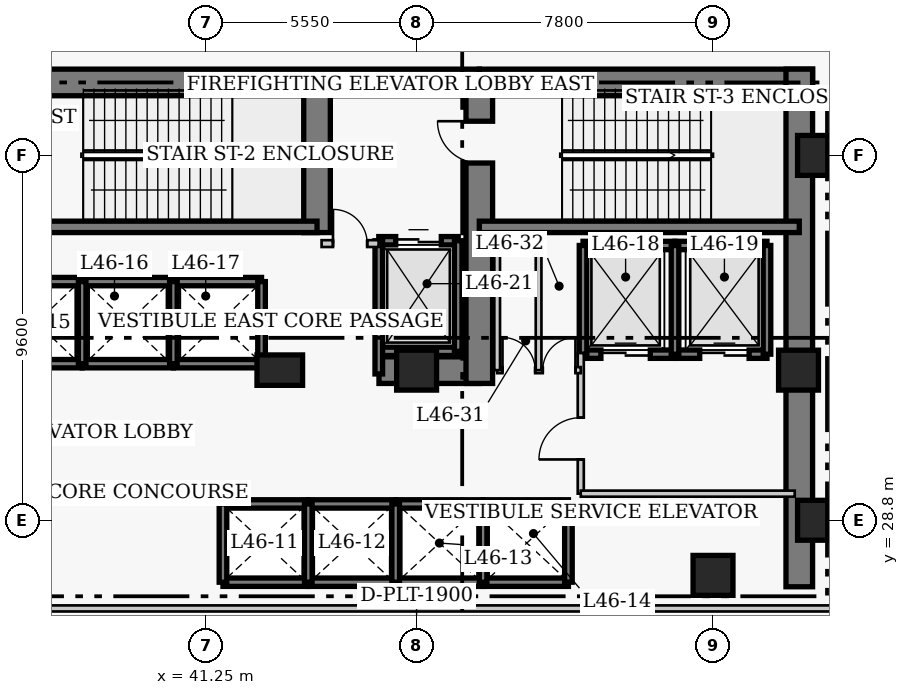
"""IFC4 building model, lengths in metres.
Left out: names, types, materials, properties, quantities, classifications, styles, units other than length and angle.
Written with IfcOpenShell. Run it as: python <this file> out.ifc"""

import sys

from ifc_helpers import new_model, si_unit, direction, frame, frame_2d, origin, origin_2d, place, context, subcontext, project, spatial, rectangle, extrude, element, fill, save


model = new_model("IFC4")
c1 = context("Model", 3, precision=1e-05, world=origin(), true_north=direction((0.0, 1.0)))
c2 = subcontext(c1, "Body", "Model", "MODEL_VIEW")
j1 = project(units=[si_unit("LENGTHUNIT", "METRE"), si_unit("PLANEANGLEUNIT", "RADIAN")], contexts=[c1])
p1 = place(None, origin())
s1 = spatial("IfcSite", under=j1, at=p1, CompositionType="ELEMENT")
p2 = place(p1, origin())
s2 = spatial("IfcBuilding", under=s1, at=p2, CompositionType="ELEMENT")
p3 = place(p2, frame((0.0, 0.0, 184.0)))
s3 = spatial("IfcBuildingStorey", under=s2, at=p3, CompositionType="ELEMENT", Elevation=184.0)
p4 = place(p3, frame((35.85, 40.32, 0.0), z_axis=(0.0, 0.0, 1.0), x_axis=(1.0, 0.0, 0.0)))
e1 = element("IfcWall", 1, at=p4, inside=s3, PredefinedType="SHEAR", context=c2, shape_type="SweptSolid", body=[
    extrude(rectangle(XDim=12.6, YDim=0.7, at=frame_2d((6.3, 0.0))), origin(), (0.0, 0.0, 1.0), 5.0),
])
p5 = place(p3, frame((48.45, 40.32, 0.0), z_axis=(0.0, 0.0, 1.0), x_axis=(1.0, 0.0, 0.0)))
e2 = element("IfcWall", 2, at=p5, inside=s3, PredefinedType="SHEAR", context=c2, shape_type="SweptSolid", body=[
    extrude(rectangle(XDim=8.77, YDim=0.7, at=frame_2d((4.385, 0.0))), origin(), (0.0, 0.0, 1.0), 5.0),
])
p6 = place(p3, frame((56.87, 27.05, 0.0), z_axis=(0.0, 0.0, 1.0), x_axis=(0.0, 1.0, 0.0)))
e3 = element("IfcWall", 3, at=p6, inside=s3, PredefinedType="SHEAR", context=c2, shape_type="SweptSolid", body=[
    extrude(rectangle(XDim=13.62, YDim=0.7, at=frame_2d((6.81, 0.0))), origin(), (0.0, 0.0, 1.0), 5.0),
])
p7 = place(p3, frame((45.81, 32.75, 0.0), z_axis=(0.0, 0.0, 1.0), x_axis=(1.0, 0.0, 0.0)))
e4 = element("IfcWall", 4, at=p7, inside=s3, PredefinedType="SHEAR", context=c2, shape_type="SweptSolid", body=[
    extrude(rectangle(XDim=2.64, YDim=0.7, at=frame_2d((1.32, 0.0))), origin(), (0.0, 0.0, 1.0), 5.0),
])
p8 = place(p3, frame((44.18, 36.37, 0.0), z_axis=(0.0, 0.0, 1.0), x_axis=(0.0, 1.0, 0.0)))
e5 = element("IfcWall", 5, at=p8, inside=s3, PredefinedType="SHEAR", context=c2, shape_type="SweptSolid", body=[
    extrude(rectangle(XDim=3.95, YDim=0.7, at=frame_2d((1.975, 0.0))), origin(), (0.0, 0.0, 1.0), 5.0),
])
p9 = place(p3, frame((48.45, 32.4, 0.0), z_axis=(0.0, 0.0, 1.0), x_axis=(0.0, 1.0, 0.0)))
e6 = element("IfcWall", 6, at=p9, inside=s3, PredefinedType="SHEAR", context=c2, shape_type="SweptSolid", body=[
    extrude(rectangle(XDim=7.92, YDim=0.7, at=frame_2d((3.96, 0.0))), origin(), (0.0, 0.0, 1.0), 5.0),
])
p10 = place(p9, frame((5.8, 0.0, 0.0)))
e7 = element("IfcOpeningElement", 7, at=p10, cuts=e6, PredefinedType="OPENING", context=c2, shape_type="SweptSolid", body=[
    extrude(rectangle(XDim=1.1, YDim=2.15, at=frame_2d((0.55, 1.075))), frame((0.0, 0.36, 0.0), z_axis=(0.0, -1.0, 0.0), x_axis=(1.0, 0.0, 0.0)), (0.0, 0.0, 1.0), 0.72),
])
p11 = place(p3, frame((35.85, 36.52, 0.0), z_axis=(0.0, 0.0, 1.0), x_axis=(1.0, 0.0, 0.0)))
e8 = element("IfcWall", 8, at=p11, inside=s3, PredefinedType="SHEAR", context=c2, shape_type="SweptSolid", body=[
    extrude(rectangle(XDim=8.33, YDim=0.3, at=frame_2d((4.165, 0.0))), origin(), (0.0, 0.0, 1.0), 5.0),
])
p12 = place(p3, frame((48.45, 36.52, 0.0), z_axis=(0.0, 0.0, 1.0), x_axis=(1.0, 0.0, 0.0)))
e9 = element("IfcWall", 9, at=p12, inside=s3, PredefinedType="SHEAR", context=c2, shape_type="SweptSolid", body=[
    extrude(rectangle(XDim=8.42, YDim=0.3, at=frame_2d((4.21, 0.0))), origin(), (0.0, 0.0, 1.0), 5.0),
])
for number, where, z_axis, x_axis in (
    (10, (57.35, 28.8, 0.0), (0.0, 0.0, 1.0), (1.0, 0.0, 0.0)),
    (11, (57.35, 38.4, 0.0), (0.0, 0.0, 1.0), (1.0, 0.0, 0.0)),
):
    element("IfcColumn", number, at=place(p3, frame(where, z_axis=z_axis, x_axis=x_axis)), inside=s3, PredefinedType="COLUMN", context=c2, shape_type="SweptSolid", body=[
        extrude(rectangle(XDim=1.05, YDim=1.05, at=origin_2d()), origin(), (0.0, 0.0, 1.0), 5.0),
    ])
p13 = place(p3, frame((43.2, 32.75, 0.0), z_axis=(0.0, 0.0, 1.0), x_axis=(1.0, 0.0, 0.0)))
e12 = element("IfcColumn", 12, at=p13, inside=s3, PredefinedType="COLUMN", context=c2, shape_type="SweptSolid", body=[
    extrude(rectangle(XDim=1.2, YDim=0.8, at=origin_2d()), origin(), (0.0, 0.0, 1.0), 5.0),
])
for number, where, z_axis, x_axis in (
    (13, (46.8, 32.75, 0.0), (0.0, 0.0, 1.0), (1.0, 0.0, 0.0)),
    (14, (54.6, 27.35, 0.0), (0.0, 0.0, 1.0), (1.0, 0.0, 0.0)),
    (15, (56.85, 32.75, 0.0), (0.0, 0.0, 1.0), (1.0, 0.0, 0.0)),
):
    element("IfcColumn", number, at=place(p3, frame(where, z_axis=z_axis, x_axis=x_axis)), inside=s3, PredefinedType="COLUMN", context=c2, shape_type="SweptSolid", body=[
        extrude(rectangle(XDim=1.05, YDim=1.05, at=origin_2d()), origin(), (0.0, 0.0, 1.0), 5.0),
    ])
for number, where, z_axis, x_axis in (
    (16, (41.705, 29.23, 0.0), (0.0, 0.0, 1.0), (1.0, 0.0, 0.0)),
    (17, (41.705, 27.17, 0.0), (0.0, 0.0, 1.0), (1.0, 0.0, 0.0)),
):
    element("IfcWall", number, at=place(p3, frame(where, z_axis=z_axis, x_axis=x_axis)), inside=s3, PredefinedType="SHEAR", context=c2, shape_type="SweptSolid", body=[
        extrude(rectangle(XDim=2.245, YDim=0.22, at=frame_2d((1.123, 0.0))), origin(), (0.0, 0.0, 1.0), 5.0),
    ])
p14 = place(p3, frame((41.705, 27.17, 0.0), z_axis=(0.0, 0.0, 1.0), x_axis=(0.0, 1.0, 0.0)))
e18 = element("IfcWall", 18, at=p14, inside=s3, PredefinedType="SHEAR", context=c2, shape_type="SweptSolid", body=[
    extrude(rectangle(XDim=2.06, YDim=0.2, at=frame_2d((1.03, 0.0))), origin(), (0.0, 0.0, 1.0), 5.0),
])
for number, where, z_axis, x_axis in (
    (19, (43.95, 29.23, 0.0), (0.0, 0.0, 1.0), (1.0, 0.0, 0.0)),
    (20, (43.95, 27.17, 0.0), (0.0, 0.0, 1.0), (1.0, 0.0, 0.0)),
):
    element("IfcWall", number, at=place(p3, frame(where, z_axis=z_axis, x_axis=x_axis)), inside=s3, PredefinedType="SHEAR", context=c2, shape_type="SweptSolid", body=[
        extrude(rectangle(XDim=2.3, YDim=0.22, at=frame_2d((1.15, 0.0))), origin(), (0.0, 0.0, 1.0), 5.0),
    ])
p15 = place(p3, frame((43.95, 27.17, 0.0), z_axis=(0.0, 0.0, 1.0), x_axis=(0.0, 1.0, 0.0)))
e21 = element("IfcWall", 21, at=p15, inside=s3, PredefinedType="SHEAR", context=c2, shape_type="SweptSolid", body=[
    extrude(rectangle(XDim=2.06, YDim=0.2, at=frame_2d((1.03, 0.0))), origin(), (0.0, 0.0, 1.0), 5.0),
])
for number, where, z_axis, x_axis in (
    (22, (46.25, 29.23, 0.0), (0.0, 0.0, 1.0), (1.0, 0.0, 0.0)),
    (23, (46.25, 27.17, 0.0), (0.0, 0.0, 1.0), (1.0, 0.0, 0.0)),
):
    element("IfcWall", number, at=place(p3, frame(where, z_axis=z_axis, x_axis=x_axis)), inside=s3, PredefinedType="SHEAR", context=c2, shape_type="SweptSolid", body=[
        extrude(rectangle(XDim=2.3, YDim=0.22, at=frame_2d((1.15, 0.0))), origin(), (0.0, 0.0, 1.0), 5.0),
    ])
p16 = place(p3, frame((46.25, 27.17, 0.0), z_axis=(0.0, 0.0, 1.0), x_axis=(0.0, 1.0, 0.0)))
e24 = element("IfcWall", 24, at=p16, inside=s3, PredefinedType="SHEAR", context=c2, shape_type="SweptSolid", body=[
    extrude(rectangle(XDim=2.06, YDim=0.2, at=frame_2d((1.03, 0.0))), origin(), (0.0, 0.0, 1.0), 5.0),
])
for number, where, z_axis, x_axis in (
    (25, (48.55, 29.23, 0.0), (0.0, 0.0, 1.0), (1.0, 0.0, 0.0)),
    (26, (48.55, 27.17, 0.0), (0.0, 0.0, 1.0), (1.0, 0.0, 0.0)),
):
    element("IfcWall", number, at=place(p3, frame(where, z_axis=z_axis, x_axis=x_axis)), inside=s3, PredefinedType="SHEAR", context=c2, shape_type="SweptSolid", body=[
        extrude(rectangle(XDim=2.245, YDim=0.22, at=frame_2d((1.123, 0.0))), origin(), (0.0, 0.0, 1.0), 5.0),
    ])
for number, where, z_axis, x_axis in (
    (27, (48.55, 27.17, 0.0), (0.0, 0.0, 1.0), (0.0, 1.0, 0.0)),
    (28, (50.795, 27.17, 0.0), (0.0, 0.0, 1.0), (0.0, 1.0, 0.0)),
):
    element("IfcWall", number, at=place(p3, frame(where, z_axis=z_axis, x_axis=x_axis)), inside=s3, PredefinedType="SHEAR", context=c2, shape_type="SweptSolid", body=[
        extrude(rectangle(XDim=2.06, YDim=0.2, at=frame_2d((1.03, 0.0))), origin(), (0.0, 0.0, 1.0), 5.0),
    ])
for number, where, z_axis, x_axis in (
    (29, (35.68, 35.08, 0.0), (0.0, 0.0, 1.0), (1.0, 0.0, 0.0)),
    (30, (35.68, 32.92, 0.0), (0.0, 0.0, 1.0), (1.0, 0.0, 0.0)),
):
    element("IfcWall", number, at=place(p3, frame(where, z_axis=z_axis, x_axis=x_axis)), inside=s3, PredefinedType="SHEAR", context=c2, shape_type="SweptSolid", body=[
        extrude(rectangle(XDim=2.32, YDim=0.22, at=frame_2d((1.16, 0.0))), origin(), (0.0, 0.0, 1.0), 5.0),
    ])
for number, where, z_axis, x_axis in (
    (31, (38.0, 35.08, 0.0), (0.0, 0.0, 1.0), (1.0, 0.0, 0.0)),
    (32, (38.0, 32.92, 0.0), (0.0, 0.0, 1.0), (1.0, 0.0, 0.0)),
):
    element("IfcWall", number, at=place(p3, frame(where, z_axis=z_axis, x_axis=x_axis)), inside=s3, PredefinedType="SHEAR", context=c2, shape_type="SweptSolid", body=[
        extrude(rectangle(XDim=2.4, YDim=0.22, at=frame_2d((1.2, 0.0))), origin(), (0.0, 0.0, 1.0), 5.0),
    ])
p17 = place(p3, frame((38.0, 32.92, 0.0), z_axis=(0.0, 0.0, 1.0), x_axis=(0.0, 1.0, 0.0)))
e33 = element("IfcWall", 33, at=p17, inside=s3, PredefinedType="SHEAR", context=c2, shape_type="SweptSolid", body=[
    extrude(rectangle(XDim=2.16, YDim=0.2, at=frame_2d((1.08, 0.0))), origin(), (0.0, 0.0, 1.0), 5.0),
])
for number, where, z_axis, x_axis in (
    (34, (40.4, 35.08, 0.0), (0.0, 0.0, 1.0), (1.0, 0.0, 0.0)),
    (35, (40.4, 32.92, 0.0), (0.0, 0.0, 1.0), (1.0, 0.0, 0.0)),
):
    element("IfcWall", number, at=place(p3, frame(where, z_axis=z_axis, x_axis=x_axis)), inside=s3, PredefinedType="SHEAR", context=c2, shape_type="SweptSolid", body=[
        extrude(rectangle(XDim=2.32, YDim=0.22, at=frame_2d((1.16, 0.0))), origin(), (0.0, 0.0, 1.0), 5.0),
    ])
for number, where, z_axis, x_axis in (
    (36, (40.4, 32.92, 0.0), (0.0, 0.0, 1.0), (0.0, 1.0, 0.0)),
    (37, (42.72, 32.92, 0.0), (0.0, 0.0, 1.0), (0.0, 1.0, 0.0)),
):
    element("IfcWall", number, at=place(p3, frame(where, z_axis=z_axis, x_axis=x_axis)), inside=s3, PredefinedType="SHEAR", context=c2, shape_type="SweptSolid", body=[
        extrude(rectangle(XDim=2.16, YDim=0.2, at=frame_2d((1.08, 0.0))), origin(), (0.0, 0.0, 1.0), 5.0),
    ])
p18 = place(p3, frame((51.18, 36.03, 0.0), z_axis=(0.0, 0.0, 1.0), x_axis=(1.0, 0.0, 0.0)))
e38 = element("IfcWall", 38, at=p18, inside=s3, PredefinedType="SHEAR", context=c2, shape_type="SweptSolid", body=[
    extrude(rectangle(XDim=2.42, YDim=0.22, at=frame_2d((1.21, 0.0))), origin(), (0.0, 0.0, 1.0), 5.0),
])
p19 = place(p3, frame((51.18, 33.17, 0.0), z_axis=(0.0, 0.0, 1.0), x_axis=(1.0, 0.0, 0.0)))
e39 = element("IfcWall", 39, at=p19, inside=s3, PredefinedType="SHEAR", context=c2, shape_type="SweptSolid", body=[
    extrude(rectangle(XDim=2.42, YDim=0.22, at=frame_2d((1.21, 0.0))), origin(), (0.0, 0.0, 1.0), 5.0),
])
p20 = place(p19, frame((0.47, 0.0, 0.0)))
e40 = element("IfcOpeningElement", 40, at=p20, cuts=e39, PredefinedType="OPENING", context=c2, shape_type="SweptSolid", body=[
    extrude(rectangle(XDim=1.3, YDim=2.15, at=frame_2d((0.65, 1.075))), frame((0.0, 0.12, 0.0), z_axis=(0.0, -1.0, 0.0), x_axis=(1.0, 0.0, 0.0)), (0.0, 0.0, 1.0), 0.24),
])
p21 = place(p3, frame((51.18, 33.17, 0.0), z_axis=(0.0, 0.0, 1.0), x_axis=(0.0, 1.0, 0.0)))
e41 = element("IfcWall", 41, at=p21, inside=s3, PredefinedType="SHEAR", context=c2, shape_type="SweptSolid", body=[
    extrude(rectangle(XDim=2.86, YDim=0.2, at=frame_2d((1.43, 0.0))), origin(), (0.0, 0.0, 1.0), 5.0),
])
p22 = place(p3, frame((53.6, 36.03, 0.0), z_axis=(0.0, 0.0, 1.0), x_axis=(1.0, 0.0, 0.0)))
e42 = element("IfcWall", 42, at=p22, inside=s3, PredefinedType="SHEAR", context=c2, shape_type="SweptSolid", body=[
    extrude(rectangle(XDim=2.42, YDim=0.22, at=frame_2d((1.21, 0.0))), origin(), (0.0, 0.0, 1.0), 5.0),
])
p23 = place(p3, frame((53.6, 33.17, 0.0), z_axis=(0.0, 0.0, 1.0), x_axis=(1.0, 0.0, 0.0)))
e43 = element("IfcWall", 43, at=p23, inside=s3, PredefinedType="SHEAR", context=c2, shape_type="SweptSolid", body=[
    extrude(rectangle(XDim=2.42, YDim=0.22, at=frame_2d((1.21, 0.0))), origin(), (0.0, 0.0, 1.0), 5.0),
])
p24 = place(p23, frame((0.65, 0.0, 0.0)))
e44 = element("IfcOpeningElement", 44, at=p24, cuts=e43, PredefinedType="OPENING", context=c2, shape_type="SweptSolid", body=[
    extrude(rectangle(XDim=1.3, YDim=2.15, at=frame_2d((0.65, 1.075))), frame((0.0, 0.12, 0.0), z_axis=(0.0, -1.0, 0.0), x_axis=(1.0, 0.0, 0.0)), (0.0, 0.0, 1.0), 0.24),
])
for number, where, z_axis, x_axis in (
    (45, (53.6, 33.17, 0.0), (0.0, 0.0, 1.0), (0.0, 1.0, 0.0)),
    (46, (56.02, 33.17, 0.0), (0.0, 0.0, 1.0), (0.0, 1.0, 0.0)),
):
    element("IfcWall", number, at=place(p3, frame(where, z_axis=z_axis, x_axis=x_axis)), inside=s3, PredefinedType="SHEAR", context=c2, shape_type="SweptSolid", body=[
        extrude(rectangle(XDim=2.86, YDim=0.2, at=frame_2d((1.43, 0.0))), origin(), (0.0, 0.0, 1.0), 5.0),
    ])
p25 = place(p3, frame((45.805, 36.155, 0.0), z_axis=(0.0, 0.0, 1.0), x_axis=(1.0, 0.0, 0.0)))
e47 = element("IfcWall", 47, at=p25, inside=s3, PredefinedType="SHEAR", context=c2, shape_type="SweptSolid", body=[
    extrude(rectangle(XDim=2.09, YDim=0.22, at=frame_2d((1.045, 0.0))), origin(), (0.0, 0.0, 1.0), 5.0),
])
p26 = place(p25, frame((0.445, 0.0, 0.0)))
e48 = element("IfcOpeningElement", 48, at=p26, cuts=e47, PredefinedType="OPENING", context=c2, shape_type="SweptSolid", body=[
    extrude(rectangle(XDim=1.2, YDim=2.15, at=frame_2d((0.6, 1.075))), frame((0.0, 0.12, 0.0), z_axis=(0.0, -1.0, 0.0), x_axis=(1.0, 0.0, 0.0)), (0.0, 0.0, 1.0), 0.24),
])
p27 = place(p3, frame((45.805, 33.245, 0.0), z_axis=(0.0, 0.0, 1.0), x_axis=(1.0, 0.0, 0.0)))
e49 = element("IfcWall", 49, at=p27, inside=s3, PredefinedType="SHEAR", context=c2, shape_type="SweptSolid", body=[
    extrude(rectangle(XDim=2.09, YDim=0.22, at=frame_2d((1.045, 0.0))), origin(), (0.0, 0.0, 1.0), 5.0),
])
p28 = place(p3, frame((45.805, 32.65, 0.0), z_axis=(0.0, 0.0, 1.0), x_axis=(0.0, 1.0, 0.0)))
e50 = element("IfcWall", 50, at=p28, inside=s3, PredefinedType="SHEAR", context=c2, shape_type="SweptSolid", body=[
    extrude(rectangle(XDim=3.505, YDim=0.2, at=frame_2d((1.752, 0.0))), origin(), (0.0, 0.0, 1.0), 5.0),
])
p29 = place(p3, frame((47.895, 33.245, 0.0), z_axis=(0.0, 0.0, 1.0), x_axis=(0.0, 1.0, 0.0)))
e51 = element("IfcWall", 51, at=p29, inside=s3, PredefinedType="SHEAR", context=c2, shape_type="SweptSolid", body=[
    extrude(rectangle(XDim=2.91, YDim=0.2, at=frame_2d((1.455, 0.0))), origin(), (0.0, 0.0, 1.0), 5.0),
])
p30 = place(p3, frame((44.3, 36.08, 0.0), z_axis=(0.0, 0.0, 1.0), x_axis=(1.0, 0.0, 0.0)))
e52 = element("IfcWall", 52, at=p30, inside=s3, PredefinedType="PARTITIONING", context=c2, shape_type="SweptSolid", body=[
    extrude(rectangle(XDim=1.5, YDim=0.18, at=frame_2d((0.75, 0.0))), origin(), (0.0, 0.0, 1.0), 4.75),
])
p31 = place(p30, frame((0.3, 0.0, 0.0)))
e53 = element("IfcOpeningElement", 53, at=p31, cuts=e52, PredefinedType="OPENING", context=c2, shape_type="SweptSolid", body=[
    extrude(rectangle(XDim=0.9, YDim=2.15, at=frame_2d((0.45, 1.075))), frame((0.0, 0.1, 0.0), z_axis=(0.0, -1.0, 0.0), x_axis=(1.0, 0.0, 0.0)), (0.0, 0.0, 1.0), 0.2),
])
p32 = place(p3, frame((51.12, 29.5, 0.0), z_axis=(0.0, 0.0, 1.0), x_axis=(0.0, 1.0, 0.0)))
e54 = element("IfcWall", 54, at=p32, inside=s3, PredefinedType="PARTITIONING", context=c2, shape_type="SweptSolid", body=[
    extrude(rectangle(XDim=3.7, YDim=0.16, at=frame_2d((1.85, 0.0))), origin(), (0.0, 0.0, 1.0), 4.75),
])
p33 = place(p32, frame((0.9, 0.0, 0.0)))
e55 = element("IfcOpeningElement", 55, at=p33, cuts=e54, PredefinedType="OPENING", context=c2, shape_type="SweptSolid", body=[
    extrude(rectangle(XDim=1.1, YDim=2.15, at=frame_2d((0.55, 1.075))), frame((0.0, 0.09, 0.0), z_axis=(0.0, -1.0, 0.0), x_axis=(1.0, 0.0, 0.0)), (0.0, 0.0, 1.0), 0.18),
])
p34 = place(p3, frame((51.12, 29.5, 0.0), z_axis=(0.0, 0.0, 1.0), x_axis=(1.0, 0.0, 0.0)))
e56 = element("IfcWall", 56, at=p34, inside=s3, PredefinedType="PARTITIONING", context=c2, shape_type="SweptSolid", body=[
    extrude(rectangle(XDim=5.63, YDim=0.16, at=frame_2d((2.815, 0.0))), origin(), (0.0, 0.0, 1.0), 4.75),
])
p35 = place(p3, frame((48.92, 32.75, 0.0), z_axis=(0.0, 0.0, 1.0), x_axis=(1.0, 0.0, 0.0)))
e57 = element("IfcWall", 57, at=p35, inside=s3, PredefinedType="PARTITIONING", context=c2, shape_type="SweptSolid", body=[
    extrude(rectangle(XDim=2.2, YDim=0.16, at=frame_2d((1.1, 0.0))), origin(), (0.0, 0.0, 1.0), 4.75),
])
p36 = place(p35, frame((0.14, 0.0, 0.0)))
e58 = element("IfcOpeningElement", 58, at=p36, cuts=e57, PredefinedType="OPENING", context=c2, shape_type="SweptSolid", body=[
    extrude(rectangle(XDim=0.86, YDim=2.05, at=frame_2d((0.43, 1.025))), frame((0.0, 0.09, 0.0), z_axis=(0.0, -1.0, 0.0), x_axis=(1.0, 0.0, 0.0)), (0.0, 0.0, 1.0), 0.18),
])
p37 = place(p35, frame((1.2, 0.0, 0.0)))
e59 = element("IfcOpeningElement", 59, at=p37, cuts=e57, PredefinedType="OPENING", context=c2, shape_type="SweptSolid", body=[
    extrude(rectangle(XDim=0.86, YDim=2.05, at=frame_2d((0.43, 1.025))), frame((0.0, 0.09, 0.0), z_axis=(0.0, -1.0, 0.0), x_axis=(1.0, 0.0, 0.0)), (0.0, 0.0, 1.0), 0.18),
])
for number, where, z_axis, x_axis in (
    (60, (48.92, 32.75, 0.0), (0.0, 0.0, 1.0), (0.0, 1.0, 0.0)),
    (61, (50.01, 32.75, 0.0), (0.0, 0.0, 1.0), (0.0, 1.0, 0.0)),
):
    element("IfcWall", number, at=place(p3, frame(where, z_axis=z_axis, x_axis=x_axis)), inside=s3, PredefinedType="PARTITIONING", context=c2, shape_type="SweptSolid", body=[
        extrude(rectangle(XDim=3.62, YDim=0.15, at=frame_2d((1.81, 0.0))), origin(), (0.0, 0.0, 1.0), 4.75),
    ])
p38 = place(p3, frame((6.2, 26.48, 0.0), z_axis=(0.0, 0.0, 1.0), x_axis=(1.0, 0.0, 0.0)))
e62 = element("IfcWall", 62, at=p38, inside=s3, PredefinedType="PARTITIONING", context=c2, shape_type="SweptSolid", body=[
    extrude(rectangle(XDim=65.6, YDim=0.16, at=frame_2d((32.8, 0.0))), origin(), (0.0, 0.0, 1.0), 4.75),
])
p39 = place(p38, frame((28.754, 0.0, 0.0)))
e63 = element("IfcOpeningElement", 63, at=p39, cuts=e62, PredefinedType="OPENING", context=c2, shape_type="SweptSolid", body=[
    extrude(rectangle(XDim=1.8, YDim=2.2, at=frame_2d((0.9, 1.1))), frame((0.0, 0.09, 0.0), z_axis=(0.0, -1.0, 0.0), x_axis=(1.0, 0.0, 0.0)), (0.0, 0.0, 1.0), 0.18),
])
p40 = place(p20, origin())
e64 = element("IfcDoor", 64, at=p40, inside=s3, OperationType="DOUBLE_DOOR_SLIDING", PredefinedType="DOOR", context=c2, shape_type="SweptSolid", body=[
    extrude(rectangle(XDim=1.3, YDim=2.15, at=frame_2d((0.65, 1.075))), frame((0.0, 0.025, 0.0), z_axis=(0.0, -1.0, 0.0), x_axis=(1.0, 0.0, 0.0)), (0.0, 0.0, 1.0), 0.05),
])
fill(e40, e64)
p41 = place(p24, origin())
e65 = element("IfcDoor", 65, at=p41, inside=s3, OperationType="DOUBLE_DOOR_SLIDING", PredefinedType="DOOR", context=c2, shape_type="SweptSolid", body=[
    extrude(rectangle(XDim=1.3, YDim=2.15, at=frame_2d((0.65, 1.075))), frame((0.0, 0.025, 0.0), z_axis=(0.0, -1.0, 0.0), x_axis=(1.0, 0.0, 0.0)), (0.0, 0.0, 1.0), 0.05),
])
fill(e44, e65)
p42 = place(p26, origin())
e66 = element("IfcDoor", 66, at=p42, inside=s3, OperationType="DOUBLE_DOOR_SLIDING", PredefinedType="DOOR", context=c2, shape_type="SweptSolid", body=[
    extrude(rectangle(XDim=1.2, YDim=2.15, at=frame_2d((0.6, 1.075))), frame((0.0, 0.025, 0.0), z_axis=(0.0, -1.0, 0.0), x_axis=(1.0, 0.0, 0.0)), (0.0, 0.0, 1.0), 0.05),
])
fill(e48, e66)
p43 = place(p31, origin())
e67 = element("IfcDoor", 67, at=p43, inside=s3, OperationType="SINGLE_SWING_LEFT", PredefinedType="DOOR", context=c2, shape_type="SweptSolid", body=[
    extrude(rectangle(XDim=0.9, YDim=2.15, at=frame_2d((0.45, 1.075))), frame((0.0, 0.025, 0.0), z_axis=(0.0, -1.0, 0.0), x_axis=(1.0, 0.0, 0.0)), (0.0, 0.0, 1.0), 0.05),
])
fill(e53, e67)
p44 = place(p33, origin())
e68 = element("IfcDoor", 68, at=p44, inside=s3, OperationType="SINGLE_SWING_LEFT", PredefinedType="DOOR", context=c2, shape_type="SweptSolid", body=[
    extrude(rectangle(XDim=1.1, YDim=2.15, at=frame_2d((0.55, 1.075))), frame((0.0, 0.025, 0.0), z_axis=(0.0, -1.0, 0.0), x_axis=(1.0, 0.0, 0.0)), (0.0, 0.0, 1.0), 0.05),
])
fill(e55, e68)
p45 = place(p36, origin())
e69 = element("IfcDoor", 69, at=p45, inside=s3, OperationType="SINGLE_SWING_LEFT", PredefinedType="DOOR", context=c2, shape_type="SweptSolid", body=[
    extrude(rectangle(XDim=0.86, YDim=2.05, at=frame_2d((0.43, 1.025))), frame((0.0, 0.025, 0.0), z_axis=(0.0, -1.0, 0.0), x_axis=(1.0, 0.0, 0.0)), (0.0, 0.0, 1.0), 0.05),
])
fill(e58, e69)
p46 = place(p37, origin())
e70 = element("IfcDoor", 70, at=p46, inside=s3, OperationType="SINGLE_SWING_RIGHT", PredefinedType="DOOR", context=c2, shape_type="SweptSolid", body=[
    extrude(rectangle(XDim=0.86, YDim=2.05, at=frame_2d((0.43, 1.025))), frame((0.0, 0.025, 0.0), z_axis=(0.0, -1.0, 0.0), x_axis=(1.0, 0.0, 0.0)), (0.0, 0.0, 1.0), 0.05),
])
fill(e59, e70)
p47 = place(p10, origin())
e71 = element("IfcDoor", 71, at=p47, inside=s3, OperationType="SINGLE_SWING_RIGHT", PredefinedType="DOOR", context=c2, shape_type="SweptSolid", body=[
    extrude(rectangle(XDim=1.1, YDim=2.15, at=frame_2d((0.55, 1.075))), frame((0.0, 0.025, 0.0), z_axis=(0.0, -1.0, 0.0), x_axis=(1.0, 0.0, 0.0)), (0.0, 0.0, 1.0), 0.05),
])
fill(e7, e71)
save(model, sys.argv[1])
